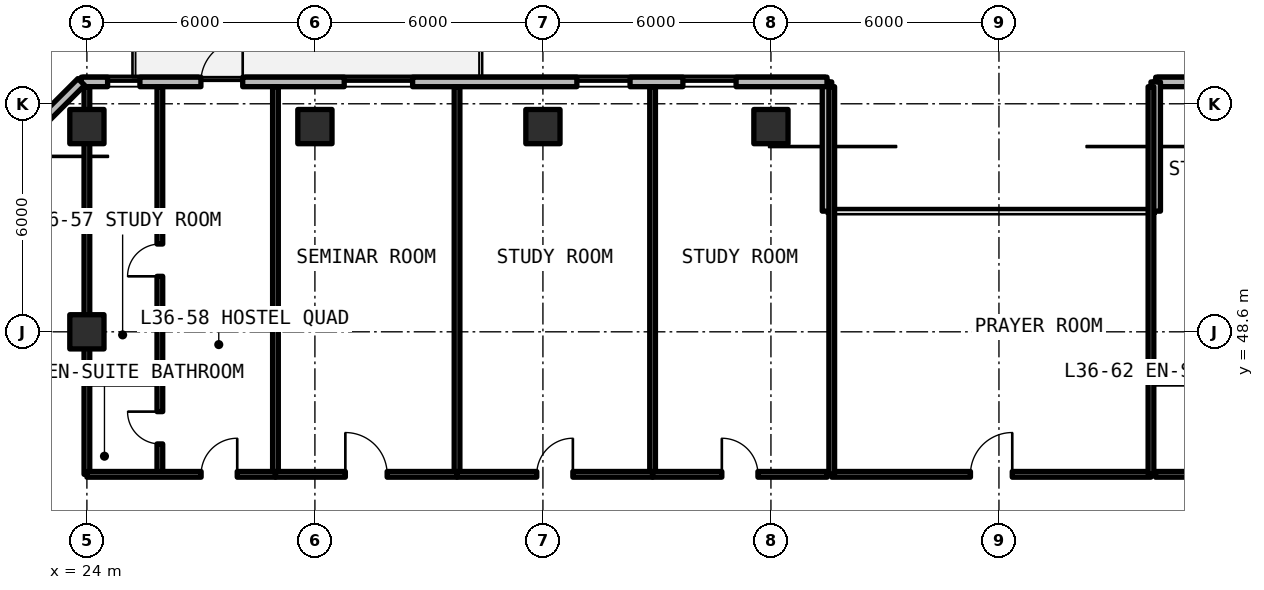
"""IFC4 building model, lengths in metres.
Left out: names, types, materials, properties, quantities, classifications, styles, units other than length and angle.
Written with IfcOpenShell. Run it as: python <this file> out.ifc"""

import sys

from ifc_helpers import new_model, si_unit, direction, frame, frame_2d, origin, origin_2d, place, context, subcontext, project, spatial, rectangle, extrude, element, fill, save


model = new_model("IFC4")
c1 = context("Model", 3, precision=1e-05, world=origin(), true_north=direction((0.0, 1.0)))
c2 = subcontext(c1, "Body", "Model", "MODEL_VIEW")
j1 = project(units=[si_unit("LENGTHUNIT", "METRE"), si_unit("PLANEANGLEUNIT", "RADIAN")], contexts=[c1])
p1 = place(None, origin())
s1 = spatial("IfcSite", under=j1, at=p1, CompositionType="ELEMENT")
p2 = place(p1, origin())
s2 = spatial("IfcBuilding", under=s1, at=p2, CompositionType="ELEMENT")
p3 = place(p2, frame((0.0, 0.0, 132.0)))
s3 = spatial("IfcBuildingStorey", under=s2, at=p3, CompositionType="ELEMENT", Elevation=132.0)
for number, where, z_axis, x_axis in (
    (1, (24.0, 48.6, 0.0), (0.0, 0.0, 1.0), (1.0, 0.0, 0.0)),
    (2, (24.0, 54.0, 0.0), (0.0, 0.0, 1.0), (1.0, 0.0, 0.0)),
    (3, (30.0, 54.0, 0.0), (0.0, 0.0, 1.0), (1.0, 0.0, 0.0)),
    (4, (36.0, 54.0, 0.0), (0.0, 0.0, 1.0), (1.0, 0.0, 0.0)),
    (5, (42.0, 54.0, 0.0), (0.0, 0.0, 1.0), (1.0, 0.0, 0.0)),
):
    element("IfcColumn", number, at=place(p3, frame(where, z_axis=z_axis, x_axis=x_axis)), inside=s3, PredefinedType="COLUMN", context=c2, shape_type="SweptSolid", body=[
        extrude(rectangle(XDim=0.9, YDim=0.9, at=origin_2d()), origin(), (0.0, 0.0, 1.0), 3.3),
    ])
p4 = place(p3, frame((95.748, 55.175, 0.0), z_axis=(0.0, 0.0, 1.0), x_axis=(-1.0, 0.0, 0.0)))
e6 = element("IfcWall", 6, at=p4, inside=s3, PredefinedType="SOLIDWALL", context=c2, shape_type="SweptSolid", body=[
    extrude(rectangle(XDim=43.623, YDim=0.25, at=frame_2d((21.812, 0.0))), origin(), (0.0, 0.0, 1.0), 3.08),
])
p5 = place(p4, frame((31.598, 0.0, 0.0)))
e7 = element("IfcOpeningElement", 7, at=p5, cuts=e6, PredefinedType="OPENING", context=c2, shape_type="SweptSolid", body=[
    extrude(rectangle(XDim=1.1, YDim=2.15, at=frame_2d((0.55, 1.075))), frame((0.0, 0.135, 0.0), z_axis=(0.0, -1.0, 0.0), x_axis=(1.0, 0.0, 0.0)), (0.0, 0.0, 1.0), 0.27),
])
p6 = place(p4, frame((15.398, 0.0, 0.0)))
e8 = element("IfcOpeningElement", 8, at=p6, cuts=e6, PredefinedType="OPENING", context=c2, shape_type="SweptSolid", body=[
    extrude(rectangle(XDim=1.1, YDim=2.15, at=frame_2d((0.55, 1.075))), frame((0.0, 0.135, 0.0), z_axis=(0.0, -1.0, 0.0), x_axis=(1.0, 0.0, 0.0)), (0.0, 0.0, 1.0), 0.27),
])
p7 = place(p4, frame((40.333, 0.0, 0.78)))
e9 = element("IfcOpeningElement", 9, at=p7, cuts=e6, PredefinedType="OPENING", context=c2, shape_type="SweptSolid", body=[
    extrude(rectangle(XDim=0.85, YDim=1.65, at=frame_2d((0.425, 0.825))), frame((0.0, 0.135, 0.0), z_axis=(0.0, -1.0, 0.0), x_axis=(1.0, 0.0, 0.0)), (0.0, 0.0, 1.0), 0.27),
])
p8 = place(p4, frame((37.17, 0.0, 0.78)))
e10 = element("IfcOpeningElement", 10, at=p8, cuts=e6, PredefinedType="OPENING", context=c2, shape_type="SweptSolid", body=[
    extrude(rectangle(XDim=1.8, YDim=1.66, at=frame_2d((0.9, 0.83))), frame((0.0, 0.135, 0.0), z_axis=(0.0, -1.0, 0.0), x_axis=(1.0, 0.0, 0.0)), (0.0, 0.0, 1.0), 0.27),
])
p9 = place(p4, frame((27.615, 0.0, 0.78)))
e11 = element("IfcOpeningElement", 11, at=p9, cuts=e6, PredefinedType="OPENING", context=c2, shape_type="SweptSolid", body=[
    extrude(rectangle(XDim=0.85, YDim=1.65, at=frame_2d((0.425, 0.825))), frame((0.0, 0.135, 0.0), z_axis=(0.0, -1.0, 0.0), x_axis=(1.0, 0.0, 0.0)), (0.0, 0.0, 1.0), 0.27),
])
p10 = place(p4, frame((24.516, 0.0, 0.78)))
e12 = element("IfcOpeningElement", 12, at=p10, cuts=e6, PredefinedType="OPENING", context=c2, shape_type="SweptSolid", body=[
    extrude(rectangle(XDim=1.4, YDim=1.65, at=frame_2d((0.7, 0.825))), frame((0.0, 0.135, 0.0), z_axis=(0.0, -1.0, 0.0), x_axis=(1.0, 0.0, 0.0)), (0.0, 0.0, 1.0), 0.27),
])
p11 = place(p4, frame((20.208, 0.0, 0.78)))
e13 = element("IfcOpeningElement", 13, at=p11, cuts=e6, PredefinedType="OPENING", context=c2, shape_type="SweptSolid", body=[
    extrude(rectangle(XDim=0.85, YDim=1.65, at=frame_2d((0.425, 0.825))), frame((0.0, 0.135, 0.0), z_axis=(0.0, -1.0, 0.0), x_axis=(1.0, 0.0, 0.0)), (0.0, 0.0, 1.0), 0.27),
])
p12 = place(p4, frame((12.6, 0.0, 0.78)))
e14 = element("IfcOpeningElement", 14, at=p12, cuts=e6, PredefinedType="OPENING", context=c2, shape_type="SweptSolid", body=[
    extrude(rectangle(XDim=1.4, YDim=1.65, at=frame_2d((0.7, 0.825))), frame((0.0, 0.135, 0.0), z_axis=(0.0, -1.0, 0.0), x_axis=(1.0, 0.0, 0.0)), (0.0, 0.0, 1.0), 0.27),
])
p13 = place(p4, frame((7.831, 0.0, 0.78)))
e15 = element("IfcOpeningElement", 15, at=p13, cuts=e6, PredefinedType="OPENING", context=c2, shape_type="SweptSolid", body=[
    extrude(rectangle(XDim=1.4, YDim=1.65, at=frame_2d((0.7, 0.825))), frame((0.0, 0.135, 0.0), z_axis=(0.0, -1.0, 0.0), x_axis=(1.0, 0.0, 0.0)), (0.0, 0.0, 1.0), 0.27),
])
p14 = place(p4, frame((4.286, 0.0, 0.78)))
e16 = element("IfcOpeningElement", 16, at=p14, cuts=e6, PredefinedType="OPENING", context=c2, shape_type="SweptSolid", body=[
    extrude(rectangle(XDim=0.85, YDim=1.65, at=frame_2d((0.425, 0.825))), frame((0.0, 0.135, 0.0), z_axis=(0.0, -1.0, 0.0), x_axis=(1.0, 0.0, 0.0)), (0.0, 0.0, 1.0), 0.27),
])
p15 = place(p4, frame((1.098, 0.0, 0.78)))
e17 = element("IfcOpeningElement", 17, at=p15, cuts=e6, PredefinedType="OPENING", context=c2, shape_type="SweptSolid", body=[
    extrude(rectangle(XDim=1.8, YDim=1.66, at=frame_2d((0.9, 0.83))), frame((0.0, 0.135, 0.0), z_axis=(0.0, -1.0, 0.0), x_axis=(1.0, 0.0, 0.0)), (0.0, 0.0, 1.0), 0.27),
])
for number, where, z_axis, x_axis in (
    (18, (52.125, 55.175, 0.0), (0.0, 0.0, 1.0), (0.0, -1.0, 0.0)),
    (19, (43.475, 51.775, 0.0), (0.0, 0.0, 1.0), (0.0, 1.0, 0.0)),
):
    element("IfcWall", number, at=place(p3, frame(where, z_axis=z_axis, x_axis=x_axis)), inside=s3, PredefinedType="SOLIDWALL", context=c2, shape_type="SweptSolid", body=[
        extrude(rectangle(XDim=3.4, YDim=0.25, at=frame_2d((1.7, 0.0))), origin(), (0.0, 0.0, 1.0), 3.08),
    ])
p16 = place(p3, frame((43.475, 55.175, 0.0), z_axis=(0.0, 0.0, 1.0), x_axis=(-1.0, 0.0, 0.0)))
e20 = element("IfcWall", 20, at=p16, inside=s3, PredefinedType="SOLIDWALL", context=c2, shape_type="SweptSolid", body=[
    extrude(rectangle(XDim=19.623, YDim=0.25, at=frame_2d((9.812, 0.0))), origin(), (0.0, 0.0, 1.0), 3.08),
])
p17 = place(p16, frame((15.375, 0.0, 0.0)))
e21 = element("IfcOpeningElement", 21, at=p17, cuts=e20, PredefinedType="OPENING", context=c2, shape_type="SweptSolid", body=[
    extrude(rectangle(XDim=1.1, YDim=2.15, at=frame_2d((0.55, 1.075))), frame((0.0, 0.135, 0.0), z_axis=(0.0, -1.0, 0.0), x_axis=(1.0, 0.0, 0.0)), (0.0, 0.0, 1.0), 0.27),
])
p18 = place(p16, frame((18.08, 0.0, 0.78)))
e22 = element("IfcOpeningElement", 22, at=p18, cuts=e20, PredefinedType="OPENING", context=c2, shape_type="SweptSolid", body=[
    extrude(rectangle(XDim=0.85, YDim=1.65, at=frame_2d((0.425, 0.825))), frame((0.0, 0.135, 0.0), z_axis=(0.0, -1.0, 0.0), x_axis=(1.0, 0.0, 0.0)), (0.0, 0.0, 1.0), 0.27),
])
p19 = place(p16, frame((10.904, 0.0, 0.78)))
e23 = element("IfcOpeningElement", 23, at=p19, cuts=e20, PredefinedType="OPENING", context=c2, shape_type="SweptSolid", body=[
    extrude(rectangle(XDim=1.8, YDim=1.66, at=frame_2d((0.9, 0.83))), frame((0.0, 0.135, 0.0), z_axis=(0.0, -1.0, 0.0), x_axis=(1.0, 0.0, 0.0)), (0.0, 0.0, 1.0), 0.27),
])
p20 = place(p16, frame((5.182, 0.0, 0.78)))
e24 = element("IfcOpeningElement", 24, at=p20, cuts=e20, PredefinedType="OPENING", context=c2, shape_type="SweptSolid", body=[
    extrude(rectangle(XDim=1.4, YDim=1.65, at=frame_2d((0.7, 0.825))), frame((0.0, 0.135, 0.0), z_axis=(0.0, -1.0, 0.0), x_axis=(1.0, 0.0, 0.0)), (0.0, 0.0, 1.0), 0.27),
])
p21 = place(p16, frame((2.392, 0.0, 0.78)))
e25 = element("IfcOpeningElement", 25, at=p21, cuts=e20, PredefinedType="OPENING", context=c2, shape_type="SweptSolid", body=[
    extrude(rectangle(XDim=1.4, YDim=1.65, at=frame_2d((0.7, 0.825))), frame((0.0, 0.135, 0.0), z_axis=(0.0, -1.0, 0.0), x_axis=(1.0, 0.0, 0.0)), (0.0, 0.0, 1.0), 0.27),
])
p22 = place(p3, frame((23.852, 55.175, 0.0), z_axis=(0.0, 0.0, 1.0), x_axis=(-0.70708586489, -0.707127696864, 0.0)))
e26 = element("IfcWall", 26, at=p22, inside=s3, PredefinedType="SOLIDWALL", context=c2, shape_type="SweptSolid", body=[
    extrude(rectangle(XDim=5.836, YDim=0.25, at=frame_2d((2.918, 0.0))), origin(), (0.0, 0.0, 1.0), 3.08),
])
p23 = place(p22, frame((1.538, 0.0, 0.78)))
e27 = element("IfcOpeningElement", 27, at=p23, cuts=e26, PredefinedType="OPENING", context=c2, shape_type="SweptSolid", body=[
    extrude(rectangle(XDim=3.4, YDim=1.66, at=frame_2d((1.7, 0.83))), frame((0.0, 0.135, 0.0), z_axis=(0.0, -1.0, 0.0), x_axis=(1.0, 0.0, 0.0)), (0.0, 0.0, 1.0), 0.27),
])
p24 = place(p3, frame((43.6, 44.85, 0.0), z_axis=(0.0, 0.0, 1.0), x_axis=(1.0, 0.0, 0.0)))
e28 = element("IfcWall", 28, at=p24, inside=s3, PredefinedType="SOLIDWALL", context=c2, shape_type="SweptSolid", body=[
    extrude(rectangle(XDim=8.4, YDim=0.15, at=frame_2d((4.2, 0.0))), origin(), (0.0, 0.0, 1.0), 2.35),
])
p25 = place(p24, frame((3.65, 0.0, 0.0)))
e29 = element("IfcOpeningElement", 29, at=p25, cuts=e28, PredefinedType="OPENING", context=c2, shape_type="SweptSolid", body=[
    extrude(rectangle(XDim=1.1, YDim=2.15, at=frame_2d((0.55, 1.075))), frame((0.0, 0.085, 0.0), z_axis=(0.0, -1.0, 0.0), x_axis=(1.0, 0.0, 0.0)), (0.0, 0.0, 1.0), 0.17),
])
for number, where, z_axis, x_axis in (
    (30, (43.6, 44.85, 0.0), (0.0, 0.0, 1.0), (0.0, 1.0, 0.0)),
    (31, (52.0, 44.85, 0.0), (0.0, 0.0, 1.0), (0.0, 1.0, 0.0)),
    (32, (24.0, 44.85, 0.0), (0.0, 0.0, 1.0), (0.0, 1.0, 0.0)),
    (33, (28.962, 44.85, 0.0), (0.0, 0.0, 1.0), (0.0, 1.0, 0.0)),
):
    element("IfcWall", number, at=place(p3, frame(where, z_axis=z_axis, x_axis=x_axis)), inside=s3, PredefinedType="SOLIDWALL", context=c2, shape_type="SweptSolid", body=[
        extrude(rectangle(XDim=10.2, YDim=0.15, at=frame_2d((5.1, 0.0))), origin(), (0.0, 0.0, 1.0), 2.35),
    ])
p26 = place(p3, frame((24.0, 47.3, 0.0), z_axis=(0.0, 0.0, 1.0), x_axis=(1.0, 0.0, 0.0)))
e34 = element("IfcWall", 34, at=p26, inside=s3, PredefinedType="PARTITIONING", context=c2, shape_type="SweptSolid", body=[
    extrude(rectangle(XDim=1.92, YDim=0.15, at=frame_2d((0.96, 0.0))), origin(), (0.0, 0.0, 1.0), 2.35),
])
p27 = place(p3, frame((25.92, 44.85, 0.0), z_axis=(0.0, 0.0, 1.0), x_axis=(0.0, 1.0, 0.0)))
e35 = element("IfcWall", 35, at=p27, inside=s3, PredefinedType="PARTITIONING", context=c2, shape_type="SweptSolid", body=[
    extrude(rectangle(XDim=10.2, YDim=0.15, at=frame_2d((5.1, 0.0))), origin(), (0.0, 0.0, 1.0), 2.35),
])
p28 = place(p27, frame((0.8, 0.0, 0.0)))
e36 = element("IfcOpeningElement", 36, at=p28, cuts=e35, PredefinedType="OPENING", context=c2, shape_type="SweptSolid", body=[
    extrude(rectangle(XDim=0.85, YDim=2.1, at=frame_2d((0.425, 1.05))), frame((0.0, 0.085, 0.0), z_axis=(0.0, -1.0, 0.0), x_axis=(1.0, 0.0, 0.0)), (0.0, 0.0, 1.0), 0.17),
])
p29 = place(p27, frame((5.21, 0.0, 0.0)))
e37 = element("IfcOpeningElement", 37, at=p29, cuts=e35, PredefinedType="OPENING", context=c2, shape_type="SweptSolid", body=[
    extrude(rectangle(XDim=0.85, YDim=2.1, at=frame_2d((0.425, 1.05))), frame((0.0, 0.085, 0.0), z_axis=(0.0, -1.0, 0.0), x_axis=(1.0, 0.0, 0.0)), (0.0, 0.0, 1.0), 0.17),
])
p30 = place(p3, frame((24.0, 44.85, 0.0), z_axis=(0.0, 0.0, 1.0), x_axis=(1.0, 0.0, 0.0)))
e38 = element("IfcWall", 38, at=p30, inside=s3, PredefinedType="SOLIDWALL", context=c2, shape_type="SweptSolid", body=[
    extrude(rectangle(XDim=4.962, YDim=0.15, at=frame_2d((2.481, 0.0))), origin(), (0.0, 0.0, 1.0), 2.35),
])
p31 = place(p30, frame((3.006, 0.0, 0.0)))
e39 = element("IfcOpeningElement", 39, at=p31, cuts=e38, PredefinedType="OPENING", context=c2, shape_type="SweptSolid", body=[
    extrude(rectangle(XDim=0.95, YDim=2.15, at=frame_2d((0.475, 1.075))), frame((0.0, 0.085, 0.0), z_axis=(0.0, -1.0, 0.0), x_axis=(1.0, 0.0, 0.0)), (0.0, 0.0, 1.0), 0.17),
])
p32 = place(p3, frame((33.74, 44.85, 0.0), z_axis=(0.0, 0.0, 1.0), x_axis=(0.0, 1.0, 0.0)))
e40 = element("IfcWall", 40, at=p32, inside=s3, PredefinedType="SOLIDWALL", context=c2, shape_type="SweptSolid", body=[
    extrude(rectangle(XDim=10.2, YDim=0.15, at=frame_2d((5.1, 0.0))), origin(), (0.0, 0.0, 1.0), 2.35),
])
p33 = place(p3, frame((28.962, 44.85, 0.0), z_axis=(0.0, 0.0, 1.0), x_axis=(1.0, 0.0, 0.0)))
e41 = element("IfcWall", 41, at=p33, inside=s3, PredefinedType="SOLIDWALL", context=c2, shape_type="SweptSolid", body=[
    extrude(rectangle(XDim=4.778, YDim=0.15, at=frame_2d((2.389, 0.0))), origin(), (0.0, 0.0, 1.0), 2.35),
])
p34 = place(p33, frame((1.839, 0.0, 0.0)))
e42 = element("IfcOpeningElement", 42, at=p34, cuts=e41, PredefinedType="OPENING", context=c2, shape_type="SweptSolid", body=[
    extrude(rectangle(XDim=1.1, YDim=2.15, at=frame_2d((0.55, 1.075))), frame((0.0, 0.085, 0.0), z_axis=(0.0, -1.0, 0.0), x_axis=(1.0, 0.0, 0.0)), (0.0, 0.0, 1.0), 0.17),
])
p35 = place(p3, frame((38.886, 44.85, 0.0), z_axis=(0.0, 0.0, 1.0), x_axis=(0.0, 1.0, 0.0)))
e43 = element("IfcWall", 43, at=p35, inside=s3, PredefinedType="SOLIDWALL", context=c2, shape_type="SweptSolid", body=[
    extrude(rectangle(XDim=10.2, YDim=0.15, at=frame_2d((5.1, 0.0))), origin(), (0.0, 0.0, 1.0), 2.35),
])
p36 = place(p3, frame((33.74, 44.85, 0.0), z_axis=(0.0, 0.0, 1.0), x_axis=(1.0, 0.0, 0.0)))
e44 = element("IfcWall", 44, at=p36, inside=s3, PredefinedType="SOLIDWALL", context=c2, shape_type="SweptSolid", body=[
    extrude(rectangle(XDim=5.146, YDim=0.15, at=frame_2d((2.573, 0.0))), origin(), (0.0, 0.0, 1.0), 2.35),
])
p37 = place(p36, frame((2.098, 0.0, 0.0)))
e45 = element("IfcOpeningElement", 45, at=p37, cuts=e44, PredefinedType="OPENING", context=c2, shape_type="SweptSolid", body=[
    extrude(rectangle(XDim=0.95, YDim=2.15, at=frame_2d((0.475, 1.075))), frame((0.0, 0.085, 0.0), z_axis=(0.0, -1.0, 0.0), x_axis=(1.0, 0.0, 0.0)), (0.0, 0.0, 1.0), 0.17),
])
p38 = place(p3, frame((38.886, 44.85, 0.0), z_axis=(0.0, 0.0, 1.0), x_axis=(1.0, 0.0, 0.0)))
e46 = element("IfcWall", 46, at=p38, inside=s3, PredefinedType="SOLIDWALL", context=c2, shape_type="SweptSolid", body=[
    extrude(rectangle(XDim=4.594, YDim=0.15, at=frame_2d((2.297, 0.0))), origin(), (0.0, 0.0, 1.0), 2.35),
])
p39 = place(p38, frame((1.822, 0.0, 0.0)))
e47 = element("IfcOpeningElement", 47, at=p39, cuts=e46, PredefinedType="OPENING", context=c2, shape_type="SweptSolid", body=[
    extrude(rectangle(XDim=0.95, YDim=2.15, at=frame_2d((0.475, 1.075))), frame((0.0, 0.085, 0.0), z_axis=(0.0, -1.0, 0.0), x_axis=(1.0, 0.0, 0.0)), (0.0, 0.0, 1.0), 0.17),
])
p40 = place(p3, frame((52.12, 47.3, 0.0), z_axis=(0.0, 0.0, 1.0), x_axis=(1.0, 0.0, 0.0)))
e48 = element("IfcWall", 48, at=p40, inside=s3, PredefinedType="PARTITIONING", context=c2, shape_type="SweptSolid", body=[
    extrude(rectangle(XDim=3.8, YDim=0.15, at=frame_2d((1.9, 0.0))), origin(), (0.0, 0.0, 1.0), 2.35),
])
p41 = place(p3, frame((52.12, 44.85, 0.0), z_axis=(0.0, 0.0, 1.0), x_axis=(1.0, 0.0, 0.0)))
e49 = element("IfcWall", 49, at=p41, inside=s3, PredefinedType="SOLIDWALL", context=c2, shape_type="SweptSolid", body=[
    extrude(rectangle(XDim=7.337, YDim=0.15, at=frame_2d((3.668, 0.0))), origin(), (0.0, 0.0, 1.0), 2.35),
])
p42 = place(p41, frame((5.134, 0.0, 0.0)))
e50 = element("IfcOpeningElement", 50, at=p42, cuts=e49, PredefinedType="OPENING", context=c2, shape_type="SweptSolid", body=[
    extrude(rectangle(XDim=0.95, YDim=2.15, at=frame_2d((0.475, 1.075))), frame((0.0, 0.085, 0.0), z_axis=(0.0, -1.0, 0.0), x_axis=(1.0, 0.0, 0.0)), (0.0, 0.0, 1.0), 0.17),
])
p43 = place(p17, frame((1.1, 0.0, 0.0), z_axis=(0.0, 0.0, 1.0), x_axis=(-1.0, 0.0, 0.0)))
e51 = element("IfcDoor", 51, at=p43, inside=s3, OperationType="SINGLE_SWING_RIGHT", PredefinedType="DOOR", context=c2, shape_type="SweptSolid", body=[
    extrude(rectangle(XDim=1.1, YDim=2.15, at=frame_2d((0.55, 1.075))), frame((0.0, 0.025, 0.0), z_axis=(0.0, -1.0, 0.0), x_axis=(1.0, 0.0, 0.0)), (0.0, 0.0, 1.0), 0.05),
])
fill(e21, e51)
p44 = place(p18, origin())
e52 = element("IfcWindow", 52, at=p44, inside=s3, PartitioningType="SINGLE_PANEL", PredefinedType="WINDOW", context=c2, shape_type="SweptSolid", body=[
    extrude(rectangle(XDim=0.85, YDim=1.65, at=frame_2d((0.425, 0.825))), frame((0.0, 0.03, 0.0), z_axis=(0.0, -1.0, 0.0), x_axis=(1.0, 0.0, 0.0)), (0.0, 0.0, 1.0), 0.06),
])
fill(e22, e52)
p45 = place(p19, origin())
e53 = element("IfcWindow", 53, at=p45, inside=s3, PartitioningType="SINGLE_PANEL", PredefinedType="WINDOW", context=c2, shape_type="SweptSolid", body=[
    extrude(rectangle(XDim=1.8, YDim=1.66, at=frame_2d((0.9, 0.83))), frame((0.0, 0.03, 0.0), z_axis=(0.0, -1.0, 0.0), x_axis=(1.0, 0.0, 0.0)), (0.0, 0.0, 1.0), 0.06),
])
fill(e23, e53)
p46 = place(p20, origin())
e54 = element("IfcWindow", 54, at=p46, inside=s3, PartitioningType="SINGLE_PANEL", PredefinedType="WINDOW", context=c2, shape_type="SweptSolid", body=[
    extrude(rectangle(XDim=1.4, YDim=1.65, at=frame_2d((0.7, 0.825))), frame((0.0, 0.03, 0.0), z_axis=(0.0, -1.0, 0.0), x_axis=(1.0, 0.0, 0.0)), (0.0, 0.0, 1.0), 0.06),
])
fill(e24, e54)
p47 = place(p21, origin())
e55 = element("IfcWindow", 55, at=p47, inside=s3, PartitioningType="SINGLE_PANEL", PredefinedType="WINDOW", context=c2, shape_type="SweptSolid", body=[
    extrude(rectangle(XDim=1.4, YDim=1.65, at=frame_2d((0.7, 0.825))), frame((0.0, 0.03, 0.0), z_axis=(0.0, -1.0, 0.0), x_axis=(1.0, 0.0, 0.0)), (0.0, 0.0, 1.0), 0.06),
])
fill(e25, e55)
p48 = place(p25, origin())
e56 = element("IfcDoor", 56, at=p48, inside=s3, OperationType="SINGLE_SWING_RIGHT", PredefinedType="DOOR", context=c2, shape_type="SweptSolid", body=[
    extrude(rectangle(XDim=1.1, YDim=2.15, at=frame_2d((0.55, 1.075))), frame((0.0, 0.025, 0.0), z_axis=(0.0, -1.0, 0.0), x_axis=(1.0, 0.0, 0.0)), (0.0, 0.0, 1.0), 0.05),
])
fill(e29, e56)
p49 = place(p28, origin())
e57 = element("IfcDoor", 57, at=p49, inside=s3, OperationType="SINGLE_SWING_RIGHT", PredefinedType="DOOR", context=c2, shape_type="SweptSolid", body=[
    extrude(rectangle(XDim=0.85, YDim=2.1, at=frame_2d((0.425, 1.05))), frame((0.0, 0.025, 0.0), z_axis=(0.0, -1.0, 0.0), x_axis=(1.0, 0.0, 0.0)), (0.0, 0.0, 1.0), 0.05),
])
fill(e36, e57)
p50 = place(p29, origin())
e58 = element("IfcDoor", 58, at=p50, inside=s3, OperationType="SINGLE_SWING_LEFT", PredefinedType="DOOR", context=c2, shape_type="SweptSolid", body=[
    extrude(rectangle(XDim=0.85, YDim=2.1, at=frame_2d((0.425, 1.05))), frame((0.0, 0.025, 0.0), z_axis=(0.0, -1.0, 0.0), x_axis=(1.0, 0.0, 0.0)), (0.0, 0.0, 1.0), 0.05),
])
fill(e37, e58)
p51 = place(p31, origin())
e59 = element("IfcDoor", 59, at=p51, inside=s3, OperationType="SINGLE_SWING_RIGHT", PredefinedType="DOOR", context=c2, shape_type="SweptSolid", body=[
    extrude(rectangle(XDim=0.95, YDim=2.15, at=frame_2d((0.475, 1.075))), frame((0.0, 0.025, 0.0), z_axis=(0.0, -1.0, 0.0), x_axis=(1.0, 0.0, 0.0)), (0.0, 0.0, 1.0), 0.05),
])
fill(e39, e59)
p52 = place(p34, origin())
e60 = element("IfcDoor", 60, at=p52, inside=s3, OperationType="SINGLE_SWING_LEFT", PredefinedType="DOOR", context=c2, shape_type="SweptSolid", body=[
    extrude(rectangle(XDim=1.1, YDim=2.15, at=frame_2d((0.55, 1.075))), frame((0.0, 0.025, 0.0), z_axis=(0.0, -1.0, 0.0), x_axis=(1.0, 0.0, 0.0)), (0.0, 0.0, 1.0), 0.05),
])
fill(e42, e60)
p53 = place(p37, origin())
e61 = element("IfcDoor", 61, at=p53, inside=s3, OperationType="SINGLE_SWING_RIGHT", PredefinedType="DOOR", context=c2, shape_type="SweptSolid", body=[
    extrude(rectangle(XDim=0.95, YDim=2.15, at=frame_2d((0.475, 1.075))), frame((0.0, 0.025, 0.0), z_axis=(0.0, -1.0, 0.0), x_axis=(1.0, 0.0, 0.0)), (0.0, 0.0, 1.0), 0.05),
])
fill(e45, e61)
p54 = place(p39, origin())
e62 = element("IfcDoor", 62, at=p54, inside=s3, OperationType="SINGLE_SWING_LEFT", PredefinedType="DOOR", context=c2, shape_type="SweptSolid", body=[
    extrude(rectangle(XDim=0.95, YDim=2.15, at=frame_2d((0.475, 1.075))), frame((0.0, 0.025, 0.0), z_axis=(0.0, -1.0, 0.0), x_axis=(1.0, 0.0, 0.0)), (0.0, 0.0, 1.0), 0.05),
])
fill(e47, e62)
save(model, sys.argv[1])
